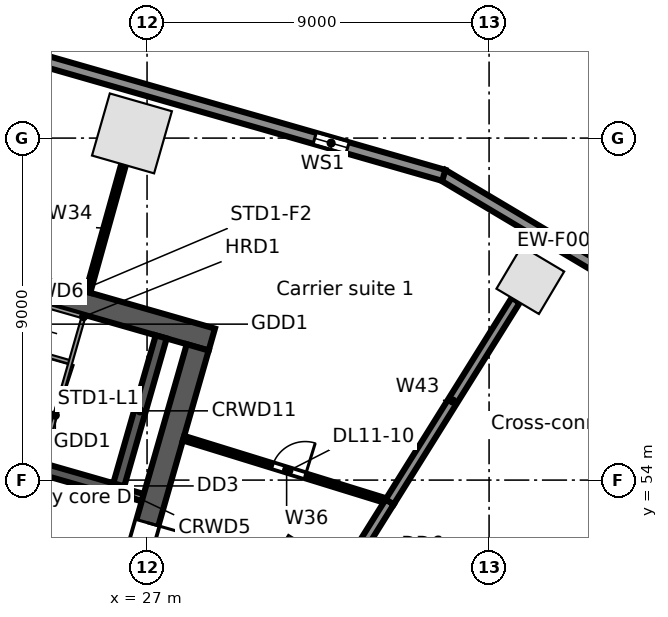
"""IFC4 building model, lengths in metres.
Left out: names, types, materials, properties, quantities, classifications, styles, units other than length and angle.
Written with IfcOpenShell. Run it as: python <this file> out.ifc"""

import sys

from ifc_helpers import new_model, si_unit, direction, frame, frame_2d, origin, origin_2d, place, context, subcontext, project, spatial, rectangle, extrude, element, fill, save


model = new_model("IFC4")
c1 = context("Model", 3, precision=1e-05, world=origin(), true_north=direction((0.0, 1.0)))
c2 = subcontext(c1, "Body", "Model", "MODEL_VIEW")
j1 = project(units=[si_unit("LENGTHUNIT", "METRE"), si_unit("PLANEANGLEUNIT", "RADIAN")], contexts=[c1])
p1 = place(None, origin())
s1 = spatial("IfcSite", under=j1, at=p1, CompositionType="ELEMENT")
p2 = place(p1, origin())
s2 = spatial("IfcBuilding", under=s1, at=p2, CompositionType="ELEMENT")
p3 = place(p2, frame((0.0, 0.0, 56.5)))
s3 = spatial("IfcBuildingStorey", under=s2, at=p3, CompositionType="ELEMENT", Elevation=56.5)
p4 = place(p3, frame((37.085, 59.262, 0.0), z_axis=(0.0, 0.0, 1.0), x_axis=(-0.859406411501, 0.511293086077, 0.0)))
e1 = element("IfcColumn", 1, at=p4, inside=s3, PredefinedType="COLUMN", context=c2, shape_type="SweptSolid", body=[
    extrude(rectangle(XDim=1.3, YDim=1.3, at=origin_2d()), origin(), (0.0, 0.0, 1.0), 5.0),
])
for number, where, z_axis, x_axis in (
    (2, (26.603, 63.124, 0.0), (0.0, 0.0, 1.0), (-0.961, 0.276, 0.0)),
    (3, (30.99, 51.386, 0.0), (0.0, 0.0, 1.0), (0.53, 0.848, 0.0)),
):
    element("IfcColumn", number, at=place(p3, frame(where, z_axis=z_axis, x_axis=x_axis)), inside=s3, PredefinedType="COLUMN", context=c2, shape_type="SweptSolid", body=[
        extrude(rectangle(XDim=1.7, YDim=1.7, at=origin_2d()), origin(), (0.0, 0.0, 1.0), 5.0),
    ])
p5 = place(p3, frame((34.773, 62.034, 0.0), z_axis=(0.0, 0.0, 1.0), x_axis=(0.859401317772, -0.511301647769, 0.0)))
e4 = element("IfcWall", 4, at=p5, inside=s3, PredefinedType="STANDARD", context=c2, shape_type="SweptSolid", body=[
    extrude(rectangle(XDim=6.808, YDim=0.3, at=frame_2d((3.404, 0.0))), origin(), (0.0, 0.0, 1.0), 4.68),
])
p6 = place(p3, frame((3.335, 71.044, 0.0), z_axis=(0.0, 0.0, 1.0), x_axis=(0.961260130989, -0.275642813387, 0.0)))
e5 = element("IfcWall", 5, at=p6, inside=s3, PredefinedType="STANDARD", context=c2, shape_type="SweptSolid", body=[
    extrude(rectangle(XDim=32.741, YDim=0.3, at=frame_2d((16.371, 0.0))), origin(), (0.0, 0.0, 1.0), 4.68),
])
p7 = place(p6, frame((29.207, 0.0, 0.6)))
e6 = element("IfcOpeningElement", 6, at=p7, cuts=e5, PredefinedType="OPENING", context=c2, shape_type="SweptSolid", body=[
    extrude(rectangle(XDim=0.9, YDim=3.2, at=frame_2d((0.45, 1.6))), frame((0.0, 0.16, 0.0), z_axis=(0.0, -1.0, 0.0), x_axis=(1.0, 0.0, 0.0)), (0.0, 0.0, 1.0), 0.32),
])
p8 = place(p6, frame((21.034, 0.0, 0.6)))
e7 = element("IfcOpeningElement", 7, at=p8, cuts=e5, PredefinedType="OPENING", context=c2, shape_type="SweptSolid", body=[
    extrude(rectangle(XDim=0.9, YDim=3.2, at=frame_2d((0.45, 1.6))), frame((0.0, 0.16, 0.0), z_axis=(0.0, -1.0, 0.0), x_axis=(1.0, 0.0, 0.0)), (0.0, 0.0, 1.0), 0.32),
])
p9 = place(p6, frame((12.861, 0.0, 0.6)))
e8 = element("IfcOpeningElement", 8, at=p9, cuts=e5, PredefinedType="OPENING", context=c2, shape_type="SweptSolid", body=[
    extrude(rectangle(XDim=0.9, YDim=3.2, at=frame_2d((0.45, 1.6))), frame((0.0, 0.16, 0.0), z_axis=(0.0, -1.0, 0.0), x_axis=(1.0, 0.0, 0.0)), (0.0, 0.0, 1.0), 0.32),
])
p10 = place(p6, frame((4.688, 0.0, 0.6)))
e9 = element("IfcOpeningElement", 9, at=p10, cuts=e5, PredefinedType="OPENING", context=c2, shape_type="SweptSolid", body=[
    extrude(rectangle(XDim=0.9, YDim=3.2, at=frame_2d((0.45, 1.6))), frame((0.0, 0.16, 0.0), z_axis=(0.0, -1.0, 0.0), x_axis=(1.0, 0.0, 0.0)), (0.0, 0.0, 1.0), 0.32),
])
p11 = place(p3, frame((21.131, 52.692, 0.0), z_axis=(0.0, 0.0, 1.0), x_axis=(0.961271492568, -0.275603188616, 0.0)))
e10 = element("IfcWall", 10, at=p11, inside=s3, PredefinedType="SOLIDWALL", context=c2, shape_type="SweptSolid", body=[
    extrude(rectangle(XDim=5.3, YDim=0.3, at=frame_2d((2.65, 0.0))), origin(), (0.0, 0.0, 1.0), 4.68),
])
p12 = place(p11, frame((2.35, 0.0, 0.0)))
e11 = element("IfcOpeningElement", 11, at=p12, cuts=e10, PredefinedType="OPENING", context=c2, shape_type="SweptSolid", body=[
    extrude(rectangle(XDim=0.9, YDim=2.1, at=frame_2d((0.45, 1.05))), frame((0.0, 0.16, 0.0), z_axis=(0.0, -1.0, 0.0), x_axis=(1.0, 0.0, 0.0)), (0.0, 0.0, 1.0), 0.32),
])
p13 = place(p3, frame((19.389, 55.689, 0.0), z_axis=(0.0, 0.0, 1.0), x_axis=(0.961261397636, -0.275638396117, 0.0)))
e12 = element("IfcWall", 12, at=p13, inside=s3, PredefinedType="SOLIDWALL", context=c2, shape_type="SweptSolid", body=[
    extrude(rectangle(XDim=7.1, YDim=0.3, at=frame_2d((3.55, 0.0))), origin(), (0.0, 0.0, 1.0), 4.68),
])
p14 = place(p13, frame((0.2, 0.0, 0.0)))
e13 = element("IfcOpeningElement", 13, at=p14, cuts=e12, PredefinedType="OPENING", context=c2, shape_type="SweptSolid", body=[
    extrude(rectangle(XDim=1.0, YDim=2.1, at=frame_2d((0.5, 1.05))), frame((0.0, 0.16, 0.0), z_axis=(0.0, -1.0, 0.0), x_axis=(1.0, 0.0, 0.0)), (0.0, 0.0, 1.0), 0.32),
])
p15 = place(p3, frame((26.214, 53.732, 0.0), z_axis=(0.0, 0.0, 1.0), x_axis=(0.96122076476, -0.27578005982, 0.0)))
e14 = element("IfcWall", 14, at=p15, inside=s3, PredefinedType="SOLIDWALL", context=c2, shape_type="SweptSolid", body=[
    extrude(rectangle(XDim=0.7, YDim=0.2, at=frame_2d((0.35, 0.0))), origin(), (0.0, 0.0, 1.0), 4.68),
])
p16 = place(p3, frame((20.053, 60.18, 0.0), z_axis=(0.0, 0.0, 1.0), x_axis=(0.96126248289, -0.275634611374, 0.0)))
e15 = element("IfcWall", 15, at=p16, inside=s3, PredefinedType="SOLIDWALL", context=c2, shape_type="SweptSolid", body=[
    extrude(rectangle(XDim=9.0, YDim=0.6, at=frame_2d((4.5, 0.0))), origin(), (0.0, 0.0, 1.0), 4.68),
])
p17 = place(p3, frame((26.256, 53.876, 0.0), z_axis=(0.0, 0.0, 1.0), x_axis=(0.275612739511, 0.961268754209, 0.0)))
e16 = element("IfcWall", 16, at=p17, inside=s3, PredefinedType="SOLIDWALL", context=c2, shape_type="SweptSolid", body=[
    extrude(rectangle(XDim=4.05, YDim=0.3, at=frame_2d((2.025, 0.0))), origin(), (0.0, 0.0, 1.0), 4.68),
])
p18 = place(p3, frame((25.356, 47.112, 0.0), z_axis=(0.0, 0.0, 1.0), x_axis=(0.275631631629, 0.961263337304, 0.0)))
e17 = element("IfcWall", 17, at=p18, inside=s3, PredefinedType="SOLIDWALL", context=c2, shape_type="SweptSolid", body=[
    extrude(rectangle(XDim=10.8, YDim=0.6, at=frame_2d((5.4, 0.0))), origin(), (0.0, 0.0, 1.0), 4.68),
])
p19 = place(p18, frame((4.8, 0.0, 0.0)))
e18 = element("IfcOpeningElement", 18, at=p19, cuts=e17, PredefinedType="OPENING", context=c2, shape_type="SweptSolid", body=[
    extrude(rectangle(XDim=1.2, YDim=2.1, at=frame_2d((0.6, 1.05))), frame((0.0, 0.31, 0.0), z_axis=(0.0, -1.0, 0.0), x_axis=(1.0, 0.0, 0.0)), (0.0, 0.0, 1.0), 0.62),
])
p20 = place(p3, frame((25.445, 58.946, 0.0), z_axis=(0.0, 0.0, 1.0), x_axis=(0.268850353538, 0.963181959654, 0.0)))
e19 = element("IfcWall", 19, at=p20, inside=s3, PredefinedType="PARTITIONING", context=c2, shape_type="SweptSolid", body=[
    extrude(rectangle(XDim=3.485, YDim=0.125, at=frame_2d((1.743, 0.0))), origin(), (0.0, 0.0, 1.0), 4.154),
])
p21 = place(p3, frame((27.96, 55.103, 0.0), z_axis=(0.0, 0.0, 1.0), x_axis=(0.955442775069, -0.29517639399, 0.0)))
e20 = element("IfcWall", 20, at=p21, inside=s3, PredefinedType="PARTITIONING", context=c2, shape_type="SweptSolid", body=[
    extrude(rectangle(XDim=5.678, YDim=0.125, at=frame_2d((2.839, 0.0))), origin(), (0.0, 0.0, 1.0), 3.748),
])
p22 = place(p21, frame((2.45, 0.0, 0.0)))
e21 = element("IfcOpeningElement", 21, at=p22, cuts=e20, PredefinedType="OPENING", context=c2, shape_type="SweptSolid", body=[
    extrude(rectangle(XDim=0.9, YDim=2.1, at=frame_2d((0.45, 1.05))), frame((0.0, 0.073, 0.0), z_axis=(0.0, -1.0, 0.0), x_axis=(1.0, 0.0, 0.0)), (0.0, 0.0, 1.0), 0.145),
])
p23 = place(p3, frame((29.675, 47.491, 0.0), z_axis=(0.0, 0.0, 1.0), x_axis=(0.529992669945, 0.848002222759, 0.0)))
e22 = element("IfcWall", 22, at=p23, inside=s3, PredefinedType="PARTITIONING", context=c2, shape_type="SweptSolid", body=[
    extrude(rectangle(XDim=7.0, YDim=0.25, at=frame_2d((3.5, 0.0))), origin(), (0.0, 0.0, 1.0), 3.742),
])
p24 = place(p3, frame((30.126, 41.882, 0.0), z_axis=(0.0, 0.0, 1.0), x_axis=(0.709029789155, 0.705178529233, 0.0)))
e23 = element("IfcWall", 23, at=p24, inside=s3, PredefinedType="PARTITIONING", context=c2, shape_type="SweptSolid", body=[
    extrude(rectangle(XDim=19.018, YDim=0.125, at=frame_2d((9.509, 0.0))), origin(), (0.0, 0.0, 1.0), 3.742),
])
p25 = place(p3, frame((33.385, 53.427, 0.0), z_axis=(0.0, 0.0, 1.0), x_axis=(0.529897235032, 0.848061861131, 0.0)))
e24 = element("IfcWall", 24, at=p25, inside=s3, PredefinedType="PARTITIONING", context=c2, shape_type="SweptSolid", body=[
    extrude(rectangle(XDim=6.258, YDim=0.25, at=frame_2d((3.129, 0.0))), origin(), (0.0, 0.0, 1.0), 3.742),
])
p26 = place(p7, origin())
e25 = element("IfcWindow", 25, at=p26, inside=s3, PartitioningType="SINGLE_PANEL", PredefinedType="WINDOW", context=c2, shape_type="SweptSolid", body=[
    extrude(rectangle(XDim=0.9, YDim=3.2, at=frame_2d((0.45, 1.6))), frame((0.0, 0.03, 0.0), z_axis=(0.0, -1.0, 0.0), x_axis=(1.0, 0.0, 0.0)), (0.0, 0.0, 1.0), 0.06),
])
fill(e6, e25)
p27 = place(p19, frame((1.2, 0.0, 0.0), z_axis=(0.0, 0.0, 1.0), x_axis=(-1.0, 0.0, 0.0)))
e26 = element("IfcDoor", 26, at=p27, inside=s3, OperationType="SINGLE_SWING_LEFT", PredefinedType="DOOR", context=c2, shape_type="SweptSolid", body=[
    extrude(rectangle(XDim=1.2, YDim=2.1, at=frame_2d((0.6, 1.05))), frame((0.0, 0.025, 0.0), z_axis=(0.0, -1.0, 0.0), x_axis=(1.0, 0.0, 0.0)), (0.0, 0.0, 1.0), 0.05),
])
fill(e18, e26)
p28 = place(p22, origin())
e27 = element("IfcDoor", 27, at=p28, inside=s3, OperationType="SINGLE_SWING_RIGHT", PredefinedType="DOOR", context=c2, shape_type="SweptSolid", body=[
    extrude(rectangle(XDim=0.9, YDim=2.1, at=frame_2d((0.45, 1.05))), frame((0.0, 0.025, 0.0), z_axis=(0.0, -1.0, 0.0), x_axis=(1.0, 0.0, 0.0)), (0.0, 0.0, 1.0), 0.05),
])
fill(e21, e27)
save(model, sys.argv[1])
